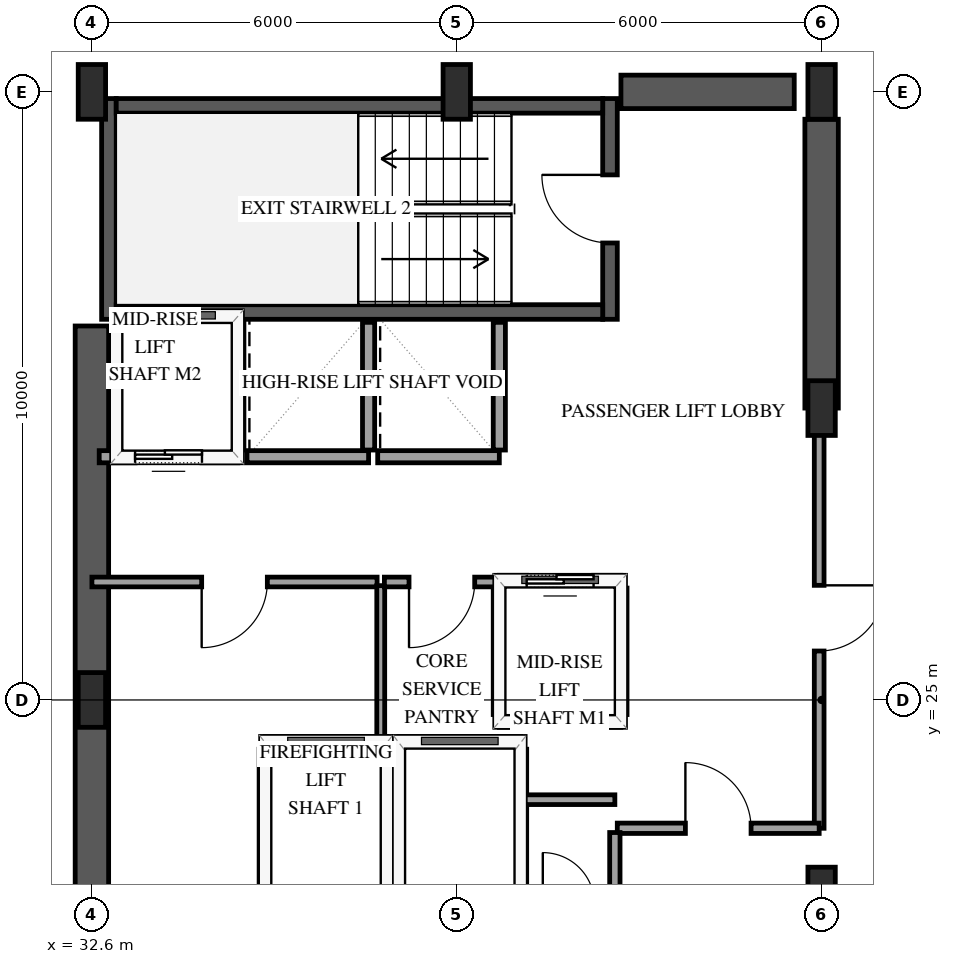
"""IFC4 building model, lengths in metres.
Left out: names, types, materials, properties, quantities, classifications, styles, units other than length and angle.
Written with IfcOpenShell. Run it as: python <this file> out.ifc"""

import sys

from ifc_helpers import new_model, si_unit, direction, frame, frame_2d, origin, origin_2d, place, context, subcontext, project, spatial, rectangle, extrude, element, fill, save


model = new_model("IFC4")
c1 = context("Model", 3, precision=1e-05, world=origin(), true_north=direction((0.0, 1.0)))
c2 = subcontext(c1, "Body", "Model", "MODEL_VIEW")
j1 = project(units=[si_unit("LENGTHUNIT", "METRE"), si_unit("PLANEANGLEUNIT", "RADIAN")], contexts=[c1])
p1 = place(None, origin())
s1 = spatial("IfcSite", under=j1, at=p1, CompositionType="ELEMENT")
p2 = place(p1, origin())
s2 = spatial("IfcBuilding", under=s1, at=p2, CompositionType="ELEMENT")
p3 = place(p2, frame((0.0, 0.0, 146.2)))
s3 = spatial("IfcBuildingStorey", under=s2, at=p3, CompositionType="ELEMENT", Elevation=146.2)
p4 = place(p3, frame((32.88, 31.26, 0.0), z_axis=(0.0, 0.0, 1.0), x_axis=(0.0, 1.0, 0.0)))
e1 = element("IfcWall", 1, at=p4, inside=s3, PredefinedType="SHEAR", context=c2, shape_type="SweptSolid", body=[
    extrude(rectangle(XDim=3.63, YDim=0.24, at=frame_2d((1.815, 0.0))), origin(), (0.0, 0.0, 1.0), 3.6),
])
p5 = place(p3, frame((41.12, 31.26, 0.0), z_axis=(0.0, 0.0, 1.0), x_axis=(0.0, 1.0, 0.0)))
e2 = element("IfcWall", 2, at=p5, inside=s3, PredefinedType="SHEAR", context=c2, shape_type="SweptSolid", body=[
    extrude(rectangle(XDim=3.63, YDim=0.24, at=frame_2d((1.815, 0.0))), origin(), (0.0, 0.0, 1.0), 3.6),
])
p6 = place(p5, frame((1.255, 0.0, 0.0)))
e3 = element("IfcOpeningElement", 3, at=p6, cuts=e2, PredefinedType="OPENING", context=c2, shape_type="SweptSolid", body=[
    extrude(rectangle(XDim=1.12, YDim=2.15, at=frame_2d((0.56, 1.075))), frame((0.0, 0.13, 0.0), z_axis=(0.0, -1.0, 0.0), x_axis=(1.0, 0.0, 0.0)), (0.0, 0.0, 1.0), 0.26),
])
for number, where, z_axis, x_axis in (
    (4, (33.0, 31.38, 0.0), (0.0, 0.0, 1.0), (1.0, 0.0, 0.0)),
    (5, (33.0, 34.77, 0.0), (0.0, 0.0, 1.0), (1.0, 0.0, 0.0)),
):
    element("IfcWall", number, at=place(p3, frame(where, z_axis=z_axis, x_axis=x_axis)), inside=s3, PredefinedType="SHEAR", context=c2, shape_type="SweptSolid", body=[
        extrude(rectangle(XDim=8.0, YDim=0.24, at=frame_2d((4.0, 0.0))), origin(), (0.0, 0.0, 1.0), 3.6),
    ])
p7 = place(p3, frame((32.6, 18.85, 0.0), z_axis=(0.0, 0.0, 1.0), x_axis=(0.0, 1.0, 0.0)))
e6 = element("IfcWall", 6, at=p7, inside=s3, PredefinedType="SHEAR", context=c2, shape_type="SweptSolid", body=[
    extrude(rectangle(XDim=12.3, YDim=0.55, at=frame_2d((6.15, 0.0))), origin(), (0.0, 0.0, 1.0), 3.6),
])
p8 = place(p3, frame((41.3, 35.0, 0.0), z_axis=(0.0, 0.0, 1.0), x_axis=(1.0, 0.0, 0.0)))
e7 = element("IfcWall", 7, at=p8, inside=s3, PredefinedType="SHEAR", context=c2, shape_type="SweptSolid", body=[
    extrude(rectangle(XDim=2.85, YDim=0.55, at=frame_2d((1.425, 0.0))), origin(), (0.0, 0.0, 1.0), 3.6),
])
p9 = place(p3, frame((44.6, 29.8, 0.0), z_axis=(0.0, 0.0, 1.0), x_axis=(0.0, 1.0, 0.0)))
e8 = element("IfcWall", 8, at=p9, inside=s3, PredefinedType="SHEAR", context=c2, shape_type="SweptSolid", body=[
    extrude(rectangle(XDim=4.75, YDim=0.55, at=frame_2d((2.375, 0.0))), origin(), (0.0, 0.0, 1.0), 3.6),
])
for number, where, z_axis, x_axis in (
    (9, (32.6, 25.0, 0.0), (0.0, 0.0, 1.0), (1.0, 0.0, 0.0)),
    (10, (32.6, 35.0, 0.0), (0.0, 0.0, 1.0), (1.0, 0.0, 0.0)),
    (11, (38.6, 35.0, 0.0), (0.0, 0.0, 1.0), (1.0, 0.0, 0.0)),
    (12, (44.6, 21.8, 0.0), (0.0, 0.0, 1.0), (1.0, 0.0, 0.0)),
    (13, (44.6, 29.8, 0.0), (0.0, 0.0, 1.0), (1.0, 0.0, 0.0)),
    (14, (44.6, 35.0, 0.0), (0.0, 0.0, 1.0), (1.0, 0.0, 0.0)),
):
    element("IfcColumn", number, at=place(p3, frame(where, z_axis=z_axis, x_axis=x_axis)), inside=s3, PredefinedType="PILASTER", context=c2, shape_type="SweptSolid", body=[
        extrude(rectangle(XDim=0.45, YDim=0.9, at=origin_2d()), origin(), (0.0, 0.0, 1.0), 3.6),
    ])
p10 = place(p3, frame((35.45, 24.3, 0.0), z_axis=(0.0, 0.0, 1.0), x_axis=(1.0, 0.0, 0.0)))
e15 = element("IfcWall", 15, at=p10, inside=s3, PredefinedType="SOLIDWALL", context=c2, shape_type="SweptSolid", body=[
    extrude(rectangle(XDim=2.0, YDim=0.2, at=frame_2d((1.0, 0.0))), origin(), (0.0, 0.0, 1.0), 3.3),
])
for number, where, z_axis, x_axis in (
    (16, (35.45, 21.81, 0.0), (0.0, 0.0, 1.0), (0.0, 1.0, 0.0)),
    (17, (37.45, 21.81, 0.0), (0.0, 0.0, 1.0), (0.0, 1.0, 0.0)),
):
    element("IfcWall", number, at=place(p3, frame(where, z_axis=z_axis, x_axis=x_axis)), inside=s3, PredefinedType="SOLIDWALL", context=c2, shape_type="SweptSolid", body=[
        extrude(rectangle(XDim=2.38, YDim=0.2, at=frame_2d((1.19, 0.0))), origin(), (0.0, 0.0, 1.0), 3.3),
    ])
p11 = place(p3, frame((37.65, 24.3, 0.0), z_axis=(0.0, 0.0, 1.0), x_axis=(1.0, 0.0, 0.0)))
e18 = element("IfcWall", 18, at=p11, inside=s3, PredefinedType="SOLIDWALL", context=c2, shape_type="SweptSolid", body=[
    extrude(rectangle(XDim=2.0, YDim=0.2, at=frame_2d((1.0, 0.0))), origin(), (0.0, 0.0, 1.0), 3.3),
])
p12 = place(p3, frame((39.65, 21.81, 0.0), z_axis=(0.0, 0.0, 1.0), x_axis=(0.0, 1.0, 0.0)))
e19 = element("IfcWall", 19, at=p12, inside=s3, PredefinedType="SOLIDWALL", context=c2, shape_type="SweptSolid", body=[
    extrude(rectangle(XDim=2.38, YDim=0.2, at=frame_2d((1.19, 0.0))), origin(), (0.0, 0.0, 1.0), 3.3),
])
p13 = place(p3, frame((39.3, 24.65, 0.0), z_axis=(0.0, 0.0, 1.0), x_axis=(1.0, 0.0, 0.0)))
e20 = element("IfcWall", 20, at=p13, inside=s3, PredefinedType="SOLIDWALL", context=c2, shape_type="SweptSolid", body=[
    extrude(rectangle(XDim=2.0, YDim=0.2, at=frame_2d((1.0, 0.0))), origin(), (0.0, 0.0, 1.0), 3.3),
])
p14 = place(p3, frame((39.3, 26.95, 0.0), z_axis=(0.0, 0.0, 1.0), x_axis=(1.0, 0.0, 0.0)))
e21 = element("IfcWall", 21, at=p14, inside=s3, PredefinedType="SOLIDWALL", context=c2, shape_type="SweptSolid", body=[
    extrude(rectangle(XDim=2.0, YDim=0.2, at=frame_2d((1.0, 0.0))), origin(), (0.0, 0.0, 1.0), 3.3),
])
p15 = place(p14, frame((0.45, 0.0, 0.0)))
e22 = element("IfcOpeningElement", 22, at=p15, cuts=e21, PredefinedType="OPENING", context=c2, shape_type="SweptSolid", body=[
    extrude(rectangle(XDim=1.1, YDim=2.15, at=frame_2d((0.55, 1.075))), frame((0.0, 0.11, 0.0), z_axis=(0.0, -1.0, 0.0), x_axis=(1.0, 0.0, 0.0)), (0.0, 0.0, 1.0), 0.22),
])
for number, where, z_axis, x_axis in (
    (23, (39.3, 24.76, 0.0), (0.0, 0.0, 1.0), (0.0, 1.0, 0.0)),
    (24, (41.3, 24.76, 0.0), (0.0, 0.0, 1.0), (0.0, 1.0, 0.0)),
):
    element("IfcWall", number, at=place(p3, frame(where, z_axis=z_axis, x_axis=x_axis)), inside=s3, PredefinedType="SOLIDWALL", context=c2, shape_type="SweptSolid", body=[
        extrude(rectangle(XDim=2.08, YDim=0.2, at=frame_2d((1.04, 0.0))), origin(), (0.0, 0.0, 1.0), 3.3),
    ])
p16 = place(p3, frame((32.72, 29.0, 0.0), z_axis=(0.0, 0.0, 1.0), x_axis=(1.0, 0.0, 0.0)))
e25 = element("IfcWall", 25, at=p16, inside=s3, PredefinedType="SOLIDWALL", context=c2, shape_type="SweptSolid", body=[
    extrude(rectangle(XDim=2.28, YDim=0.2, at=frame_2d((1.14, 0.0))), origin(), (0.0, 0.0, 1.0), 3.3),
])
p17 = place(p16, frame((0.59, 0.0, 0.0)))
e26 = element("IfcOpeningElement", 26, at=p17, cuts=e25, PredefinedType="OPENING", context=c2, shape_type="SweptSolid", body=[
    extrude(rectangle(XDim=1.1, YDim=2.15, at=frame_2d((0.55, 1.075))), frame((0.0, 0.11, 0.0), z_axis=(0.0, -1.0, 0.0), x_axis=(1.0, 0.0, 0.0)), (0.0, 0.0, 1.0), 0.22),
])
p18 = place(p3, frame((35.0, 29.11, 0.0), z_axis=(0.0, 0.0, 1.0), x_axis=(0.0, 1.0, 0.0)))
e27 = element("IfcWall", 27, at=p18, inside=s3, PredefinedType="SOLIDWALL", context=c2, shape_type="SweptSolid", body=[
    extrude(rectangle(XDim=2.1, YDim=0.2, at=frame_2d((1.05, 0.0))), origin(), (0.0, 0.0, 1.0), 3.3),
])
p19 = place(p3, frame((35.15, 29.0, 0.0), z_axis=(0.0, 0.0, 1.0), x_axis=(1.0, 0.0, 0.0)))
e28 = element("IfcWall", 28, at=p19, inside=s3, PredefinedType="SOLIDWALL", context=c2, shape_type="SweptSolid", body=[
    extrude(rectangle(XDim=2.0, YDim=0.2, at=frame_2d((1.0, 0.0))), origin(), (0.0, 0.0, 1.0), 3.3),
])
p20 = place(p3, frame((37.15, 29.11, 0.0), z_axis=(0.0, 0.0, 1.0), x_axis=(0.0, 1.0, 0.0)))
e29 = element("IfcWall", 29, at=p20, inside=s3, PredefinedType="SOLIDWALL", context=c2, shape_type="SweptSolid", body=[
    extrude(rectangle(XDim=2.1, YDim=0.2, at=frame_2d((1.05, 0.0))), origin(), (0.0, 0.0, 1.0), 3.3),
])
p21 = place(p3, frame((37.3, 29.0, 0.0), z_axis=(0.0, 0.0, 1.0), x_axis=(1.0, 0.0, 0.0)))
e30 = element("IfcWall", 30, at=p21, inside=s3, PredefinedType="SOLIDWALL", context=c2, shape_type="SweptSolid", body=[
    extrude(rectangle(XDim=2.0, YDim=0.2, at=frame_2d((1.0, 0.0))), origin(), (0.0, 0.0, 1.0), 3.3),
])
p22 = place(p3, frame((39.3, 29.11, 0.0), z_axis=(0.0, 0.0, 1.0), x_axis=(0.0, 1.0, 0.0)))
e31 = element("IfcWall", 31, at=p22, inside=s3, PredefinedType="SOLIDWALL", context=c2, shape_type="SweptSolid", body=[
    extrude(rectangle(XDim=2.1, YDim=0.2, at=frame_2d((1.05, 0.0))), origin(), (0.0, 0.0, 1.0), 3.3),
])
p23 = place(p3, frame((44.56, 29.8, 0.0), z_axis=(0.0, 0.0, 1.0), x_axis=(0.0, -1.0, 0.0)))
e32 = element("IfcWall", 32, at=p23, inside=s3, PredefinedType="PARTITIONING", context=c2, shape_type="SweptSolid", body=[
    extrude(rectangle(XDim=6.91, YDim=0.16, at=frame_2d((3.455, 0.0))), origin(), (0.0, 0.0, 1.0), 2.34),
])
p24 = place(p23, frame((2.915, 0.0, 0.0)))
e33 = element("IfcOpeningElement", 33, at=p24, cuts=e32, PredefinedType="OPENING", context=c2, shape_type="SweptSolid", body=[
    extrude(rectangle(XDim=1.08, YDim=2.15, at=frame_2d((0.54, 1.075))), frame((0.0, 0.09, 0.0), z_axis=(0.0, -1.0, 0.0), x_axis=(1.0, 0.0, 0.0)), (0.0, 0.0, 1.0), 0.18),
])
p25 = place(p3, frame((37.29, 26.94, 0.0), z_axis=(0.0, 0.0, 1.0), x_axis=(-1.0, 0.0, 0.0)))
e34 = element("IfcWall", 34, at=p25, inside=s3, PredefinedType="PARTITIONING", context=c2, shape_type="SweptSolid", body=[
    extrude(rectangle(XDim=4.69, YDim=0.16, at=frame_2d((2.345, 0.0))), origin(), (0.0, 0.0, 1.0), 3.3),
])
p26 = place(p25, frame((1.805, 0.0, 0.0)))
e35 = element("IfcOpeningElement", 35, at=p26, cuts=e34, PredefinedType="OPENING", context=c2, shape_type="SweptSolid", body=[
    extrude(rectangle(XDim=1.08, YDim=2.15, at=frame_2d((0.54, 1.075))), frame((0.0, 0.09, 0.0), z_axis=(0.0, -1.0, 0.0), x_axis=(1.0, 0.0, 0.0)), (0.0, 0.0, 1.0), 0.18),
])
p27 = place(p3, frame((41.24, 22.89, 0.0), z_axis=(0.0, 0.0, 1.0), x_axis=(1.0, 0.0, 0.0)))
e36 = element("IfcWall", 36, at=p27, inside=s3, PredefinedType="PARTITIONING", context=c2, shape_type="SweptSolid", body=[
    extrude(rectangle(XDim=3.32, YDim=0.17, at=frame_2d((1.66, 0.0))), origin(), (0.0, 0.0, 1.0), 3.3),
])
p28 = place(p27, frame((1.12, 0.0, 0.0)))
e37 = element("IfcOpeningElement", 37, at=p28, cuts=e36, PredefinedType="OPENING", context=c2, shape_type="SweptSolid", body=[
    extrude(rectangle(XDim=1.08, YDim=2.15, at=frame_2d((0.54, 1.075))), frame((0.0, 0.095, 0.0), z_axis=(0.0, -1.0, 0.0), x_axis=(1.0, 0.0, 0.0)), (0.0, 0.0, 1.0), 0.19),
])
p29 = place(p3, frame((37.35, 26.88, 0.0), z_axis=(0.0, 0.0, 1.0), x_axis=(0.0, -1.0, 0.0)))
e38 = element("IfcWall", 38, at=p29, inside=s3, PredefinedType="PARTITIONING", context=c2, shape_type="SweptSolid", body=[
    extrude(rectangle(XDim=2.58, YDim=0.13, at=frame_2d((1.29, 0.0))), origin(), (0.0, 0.0, 1.0), 3.3),
])
p30 = place(p3, frame((39.3, 26.94, 0.0), z_axis=(0.0, 0.0, 1.0), x_axis=(-1.0, 0.0, 0.0)))
e39 = element("IfcWall", 39, at=p30, inside=s3, PredefinedType="PARTITIONING", context=c2, shape_type="SweptSolid", body=[
    extrude(rectangle(XDim=1.89, YDim=0.16, at=frame_2d((0.945, 0.0))), origin(), (0.0, 0.0, 1.0), 3.3),
])
p31 = place(p30, frame((0.405, 0.0, 0.0)))
e40 = element("IfcOpeningElement", 40, at=p31, cuts=e39, PredefinedType="OPENING", context=c2, shape_type="SweptSolid", body=[
    extrude(rectangle(XDim=1.08, YDim=2.15, at=frame_2d((0.54, 1.075))), frame((0.0, 0.09, 0.0), z_axis=(0.0, -1.0, 0.0), x_axis=(1.0, 0.0, 0.0)), (0.0, 0.0, 1.0), 0.18),
])
p32 = place(p3, frame((41.2, 21.7, 0.0), z_axis=(0.0, 0.0, 1.0), x_axis=(0.0, 1.0, 0.0)))
e41 = element("IfcWall", 41, at=p32, inside=s3, PredefinedType="PARTITIONING", context=c2, shape_type="SweptSolid", body=[
    extrude(rectangle(XDim=1.12, YDim=0.17, at=frame_2d((0.56, 0.0))), origin(), (0.0, 0.0, 1.0), 3.3),
])
p33 = place(p3, frame((41.2, 23.36, 0.0), z_axis=(0.0, 0.0, 1.0), x_axis=(-1.0, 0.0, 0.0)))
e42 = element("IfcWall", 42, at=p33, inside=s3, PredefinedType="PARTITIONING", context=c2, shape_type="SweptSolid", body=[
    extrude(rectangle(XDim=1.48, YDim=0.16, at=frame_2d((0.74, 0.0))), origin(), (0.0, 0.0, 1.0), 3.3),
])
p34 = place(p15, origin())
e43 = element("IfcDoor", 43, at=p34, inside=s3, OperationType="SLIDING_TO_LEFT", PredefinedType="DOOR", context=c2, shape_type="SweptSolid", body=[
    extrude(rectangle(XDim=1.1, YDim=2.15, at=frame_2d((0.55, 1.075))), frame((0.0, 0.025, 0.0), z_axis=(0.0, -1.0, 0.0), x_axis=(1.0, 0.0, 0.0)), (0.0, 0.0, 1.0), 0.05),
])
fill(e22, e43)
p35 = place(p17, origin())
e44 = element("IfcDoor", 44, at=p35, inside=s3, OperationType="SLIDING_TO_LEFT", PredefinedType="DOOR", context=c2, shape_type="SweptSolid", body=[
    extrude(rectangle(XDim=1.1, YDim=2.15, at=frame_2d((0.55, 1.075))), frame((0.0, 0.025, 0.0), z_axis=(0.0, -1.0, 0.0), x_axis=(1.0, 0.0, 0.0)), (0.0, 0.0, 1.0), 0.05),
])
fill(e26, e44)
p36 = place(p6, origin())
e45 = element("IfcDoor", 45, at=p36, inside=s3, OperationType="SINGLE_SWING_RIGHT", PredefinedType="DOOR", context=c2, shape_type="SweptSolid", body=[
    extrude(rectangle(XDim=1.12, YDim=2.15, at=frame_2d((0.56, 1.075))), frame((0.0, 0.025, 0.0), z_axis=(0.0, -1.0, 0.0), x_axis=(1.0, 0.0, 0.0)), (0.0, 0.0, 1.0), 0.05),
])
fill(e3, e45)
p37 = place(p24, origin())
e46 = element("IfcDoor", 46, at=p37, inside=s3, OperationType="SINGLE_SWING_LEFT", PredefinedType="DOOR", context=c2, shape_type="SweptSolid", body=[
    extrude(rectangle(XDim=1.08, YDim=2.15, at=frame_2d((0.54, 1.075))), frame((0.0, 0.025, 0.0), z_axis=(0.0, -1.0, 0.0), x_axis=(1.0, 0.0, 0.0)), (0.0, 0.0, 1.0), 0.05),
])
fill(e33, e46)
p38 = place(p26, origin())
e47 = element("IfcDoor", 47, at=p38, inside=s3, OperationType="SINGLE_SWING_RIGHT", PredefinedType="DOOR", context=c2, shape_type="SweptSolid", body=[
    extrude(rectangle(XDim=1.08, YDim=2.15, at=frame_2d((0.54, 1.075))), frame((0.0, 0.025, 0.0), z_axis=(0.0, -1.0, 0.0), x_axis=(1.0, 0.0, 0.0)), (0.0, 0.0, 1.0), 0.05),
])
fill(e35, e47)
p39 = place(p28, origin())
e48 = element("IfcDoor", 48, at=p39, inside=s3, OperationType="SINGLE_SWING_LEFT", PredefinedType="DOOR", context=c2, shape_type="SweptSolid", body=[
    extrude(rectangle(XDim=1.08, YDim=2.15, at=frame_2d((0.54, 1.075))), frame((0.0, 0.025, 0.0), z_axis=(0.0, -1.0, 0.0), x_axis=(1.0, 0.0, 0.0)), (0.0, 0.0, 1.0), 0.05),
])
fill(e37, e48)
p40 = place(p31, origin())
e49 = element("IfcDoor", 49, at=p40, inside=s3, OperationType="SINGLE_SWING_RIGHT", PredefinedType="DOOR", context=c2, shape_type="SweptSolid", body=[
    extrude(rectangle(XDim=1.08, YDim=2.15, at=frame_2d((0.54, 1.075))), frame((0.0, 0.025, 0.0), z_axis=(0.0, -1.0, 0.0), x_axis=(1.0, 0.0, 0.0)), (0.0, 0.0, 1.0), 0.05),
])
fill(e40, e49)
save(model, sys.argv[1])
